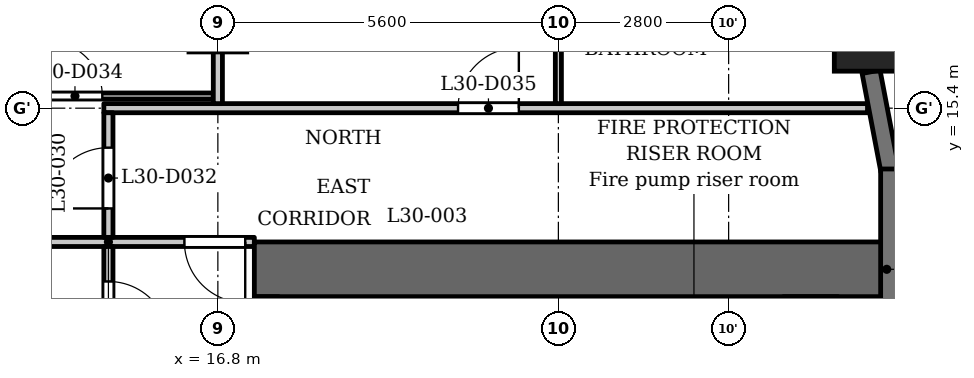
"""IFC4 building model, lengths in metres.
Left out: names, types, materials, properties, quantities, classifications, styles, units other than length and angle.
Written with IfcOpenShell. Run it as: python <this file> out.ifc"""

import sys

from ifc_helpers import new_model, si_unit, direction, frame, frame_2d, origin, origin_2d, place, context, subcontext, project, spatial, rectangle, extrude, element, fill, save


model = new_model("IFC4")
c1 = context("Model", 3, precision=1e-05, world=origin(), true_north=direction((0.0, 1.0)))
c2 = subcontext(c1, "Body", "Model", "MODEL_VIEW")
j1 = project(units=[si_unit("LENGTHUNIT", "METRE"), si_unit("PLANEANGLEUNIT", "RADIAN")], contexts=[c1])
p1 = place(None, origin())
s1 = spatial("IfcSite", under=j1, at=p1, CompositionType="ELEMENT")
p2 = place(p1, origin())
s2 = spatial("IfcBuilding", under=s1, at=p2, CompositionType="ELEMENT")
p3 = place(p2, frame((0.0, 0.0, 118.3)))
s3 = spatial("IfcBuildingStorey", under=s2, at=p3, CompositionType="ELEMENT", Elevation=118.3)
p4 = place(p3, frame((27.538, 16.609, 0.0), z_axis=(0.0, 0.0, 1.0), x_axis=(1.0, 0.0, 0.0)))
e1 = element("IfcColumn", 1, at=p4, inside=s3, PredefinedType="COLUMN", context=c2, shape_type="SweptSolid", body=[
    extrude(rectangle(XDim=1.2, YDim=1.2, at=origin_2d()), origin(), (0.0, 0.0, 1.0), 3.5),
])
p5 = place(p3, frame((16.8, 16.8, 0.0), z_axis=(0.0, 0.0, 1.0), x_axis=(1.0, 0.0, 0.0)))
e2 = element("IfcColumn", 2, at=p5, inside=s3, PredefinedType="COLUMN", context=c2, shape_type="SweptSolid", body=[
    extrude(rectangle(XDim=0.95, YDim=0.95, at=origin_2d()), origin(), (0.0, 0.0, 1.0), 3.5),
])
p6 = place(p3, frame((27.85, 11.8, 0.0), z_axis=(0.0, 0.0, 1.0), x_axis=(0.0, 1.0, 0.0)))
e3 = element("IfcWall", 3, at=p6, inside=s3, PredefinedType="SOLIDWALL", context=c2, shape_type="SweptSolid", body=[
    extrude(rectangle(XDim=2.6, YDim=0.3, at=frame_2d((1.3, 0.0))), origin(), (0.0, 0.0, 1.0), 2.4),
])
p7 = place(p3, frame((27.853, 14.372, 0.0), z_axis=(0.0, 0.0, 1.0), x_axis=(-0.187349172861, 0.982293381546, 0.0)))
e4 = element("IfcWall", 4, at=p7, inside=s3, PredefinedType="SOLIDWALL", context=c2, shape_type="SweptSolid", body=[
    extrude(rectangle(XDim=1.656, YDim=0.3, at=frame_2d((0.828, 0.0))), origin(), (0.0, 0.0, 1.0), 2.4),
])
p8 = place(p3, frame((17.4, 12.75, 0.0), z_axis=(0.0, 0.0, 1.0), x_axis=(1.0, 0.0, 0.0)))
e5 = element("IfcWall", 5, at=p8, inside=s3, PredefinedType="SHEAR", context=c2, shape_type="SweptSolid", body=[
    extrude(rectangle(XDim=10.4, YDim=0.9, at=frame_2d((5.2, 0.0))), origin(), (0.0, 0.0, 1.0), 3.2),
])
p9 = place(p3, frame((17.6, -12.3, 0.0), z_axis=(0.0, 0.0, 1.0), x_axis=(0.0, 1.0, 0.0)))
e6 = element("IfcWall", 6, at=p9, inside=s3, PredefinedType="SHEAR", context=c2, shape_type="SweptSolid", body=[
    extrude(rectangle(XDim=24.6, YDim=0.4, at=frame_2d((12.3, 0.0))), origin(), (0.0, 0.0, 1.0), 3.2),
])
p10 = place(p9, frame((6.0, 0.0, 0.0)))
e7 = element("IfcOpeningElement", 7, at=p10, cuts=e6, PredefinedType="OPENING", context=c2, shape_type="SweptSolid", body=[
    extrude(rectangle(XDim=1.1, YDim=2.1, at=frame_2d((0.55, 1.05))), frame((0.0, 0.21, 0.0), z_axis=(0.0, -1.0, 0.0), x_axis=(1.0, 0.0, 0.0)), (0.0, 0.0, 1.0), 0.42),
])
p11 = place(p9, frame((8.4, 0.0, 0.0)))
e8 = element("IfcOpeningElement", 8, at=p11, cuts=e6, PredefinedType="OPENING", context=c2, shape_type="SweptSolid", body=[
    extrude(rectangle(XDim=1.1, YDim=2.1, at=frame_2d((0.55, 1.05))), frame((0.0, 0.21, 0.0), z_axis=(0.0, -1.0, 0.0), x_axis=(1.0, 0.0, 0.0)), (0.0, 0.0, 1.0), 0.42),
])
p12 = place(p9, frame((10.8, 0.0, 0.0)))
e9 = element("IfcOpeningElement", 9, at=p12, cuts=e6, PredefinedType="OPENING", context=c2, shape_type="SweptSolid", body=[
    extrude(rectangle(XDim=1.1, YDim=2.1, at=frame_2d((0.55, 1.05))), frame((0.0, 0.21, 0.0), z_axis=(0.0, -1.0, 0.0), x_axis=(1.0, 0.0, 0.0)), (0.0, 0.0, 1.0), 0.42),
])
p13 = place(p9, frame((16.75, 0.0, 0.0)))
e10 = element("IfcOpeningElement", 10, at=p13, cuts=e6, PredefinedType="OPENING", context=c2, shape_type="SweptSolid", body=[
    extrude(rectangle(XDim=0.9, YDim=2.1, at=frame_2d((0.45, 1.05))), frame((0.0, 0.21, 0.0), z_axis=(0.0, -1.0, 0.0), x_axis=(1.0, 0.0, 0.0)), (0.0, 0.0, 1.0), 0.42),
])
p14 = place(p9, frame((22.8, 0.0, 0.0)))
e11 = element("IfcOpeningElement", 11, at=p14, cuts=e6, PredefinedType="OPENING", context=c2, shape_type="SweptSolid", body=[
    extrude(rectangle(XDim=1.1, YDim=2.1, at=frame_2d((0.55, 1.05))), frame((0.0, 0.21, 0.0), z_axis=(0.0, -1.0, 0.0), x_axis=(1.0, 0.0, 0.0)), (0.0, 0.0, 1.0), 0.42),
])
p15 = place(p9, frame((0.7, 0.0, 0.0)))
e12 = element("IfcOpeningElement", 12, at=p15, cuts=e6, PredefinedType="OPENING", context=c2, shape_type="SweptSolid", body=[
    extrude(rectangle(XDim=1.1, YDim=2.1, at=frame_2d((0.55, 1.05))), frame((0.0, 0.21, 0.0), z_axis=(0.0, -1.0, 0.0), x_axis=(1.0, 0.0, 0.0)), (0.0, 0.0, 1.0), 0.42),
])
p16 = place(p9, frame((12.775, 0.0, 0.0)))
e13 = element("IfcOpeningElement", 13, at=p16, cuts=e6, PredefinedType="OPENING", context=c2, shape_type="SweptSolid", body=[
    extrude(rectangle(XDim=1.8, YDim=2.1, at=frame_2d((0.9, 1.05))), frame((0.0, 0.21, 0.0), z_axis=(0.0, -1.0, 0.0), x_axis=(1.0, 0.0, 0.0)), (0.0, 0.0, 1.0), 0.42),
])
p17 = place(p3, frame((26.55, -12.3, 0.0), z_axis=(0.0, 0.0, 1.0), x_axis=(0.0, 1.0, 0.0)))
e14 = element("IfcWall", 14, at=p17, inside=s3, PredefinedType="SHEAR", context=c2, shape_type="SweptSolid", body=[
    extrude(rectangle(XDim=24.6, YDim=0.9, at=frame_2d((12.3, 0.0))), origin(), (0.0, 0.0, 1.0), 3.2),
])
p18 = place(p3, frame((23.55, 9.8, 0.0), z_axis=(0.0, 0.0, 1.0), x_axis=(0.0, 1.0, 0.0)))
e15 = element("IfcWall", 15, at=p18, inside=s3, PredefinedType="PARTITIONING", context=c2, shape_type="SweptSolid", body=[
    extrude(rectangle(XDim=2.5, YDim=0.2, at=frame_2d((1.25, 0.0))), origin(), (0.0, 0.0, 1.0), 3.2),
])
p19 = place(p18, frame((0.8, 0.0, 0.0)))
e16 = element("IfcOpeningElement", 16, at=p19, cuts=e15, PredefinedType="OPENING", context=c2, shape_type="SweptSolid", body=[
    extrude(rectangle(XDim=0.9, YDim=2.1, at=frame_2d((0.45, 1.05))), frame((0.0, 0.11, 0.0), z_axis=(0.0, -1.0, 0.0), x_axis=(1.0, 0.0, 0.0)), (0.0, 0.0, 1.0), 0.22),
])
p20 = place(p3, frame((-17.4, 13.2, 0.0), z_axis=(0.0, 0.0, 1.0), x_axis=(1.0, 0.0, 0.0)))
e17 = element("IfcWall", 17, at=p20, inside=s3, PredefinedType="PARTITIONING", context=c2, shape_type="SweptSolid", body=[
    extrude(rectangle(XDim=34.8, YDim=0.15, at=frame_2d((17.4, 0.0))), origin(), (0.0, 0.0, 1.0), 3.2),
])
p21 = place(p20, frame((0.25, 0.0, 0.0)))
e18 = element("IfcOpeningElement", 18, at=p21, cuts=e17, PredefinedType="OPENING", context=c2, shape_type="SweptSolid", body=[
    extrude(rectangle(XDim=1.0, YDim=2.1, at=frame_2d((0.5, 1.05))), frame((0.0, 0.085, 0.0), z_axis=(0.0, -1.0, 0.0), x_axis=(1.0, 0.0, 0.0)), (0.0, 0.0, 1.0), 0.17),
])
p22 = place(p20, frame((33.65, 0.0, 0.0)))
e19 = element("IfcOpeningElement", 19, at=p22, cuts=e17, PredefinedType="OPENING", context=c2, shape_type="SweptSolid", body=[
    extrude(rectangle(XDim=1.0, YDim=2.1, at=frame_2d((0.5, 1.05))), frame((0.0, 0.085, 0.0), z_axis=(0.0, -1.0, 0.0), x_axis=(1.0, 0.0, 0.0)), (0.0, 0.0, 1.0), 0.17),
])
p23 = place(p20, frame((15.75, 0.0, 0.0)))
e20 = element("IfcOpeningElement", 20, at=p23, cuts=e17, PredefinedType="OPENING", context=c2, shape_type="SweptSolid", body=[
    extrude(rectangle(XDim=1.0, YDim=2.1, at=frame_2d((0.5, 1.05))), frame((0.0, 0.085, 0.0), z_axis=(0.0, -1.0, 0.0), x_axis=(1.0, 0.0, 0.0)), (0.0, 0.0, 1.0), 0.17),
])
p24 = place(p20, frame((18.1, 0.0, 0.0)))
e21 = element("IfcOpeningElement", 21, at=p24, cuts=e17, PredefinedType="OPENING", context=c2, shape_type="SweptSolid", body=[
    extrude(rectangle(XDim=1.0, YDim=2.1, at=frame_2d((0.5, 1.05))), frame((0.0, 0.085, 0.0), z_axis=(0.0, -1.0, 0.0), x_axis=(1.0, 0.0, 0.0)), (0.0, 0.0, 1.0), 0.17),
])
p25 = place(p20, frame((23.55, 0.0, 0.0)))
e22 = element("IfcOpeningElement", 22, at=p25, cuts=e17, PredefinedType="OPENING", context=c2, shape_type="SweptSolid", body=[
    extrude(rectangle(XDim=1.0, YDim=2.1, at=frame_2d((0.5, 1.05))), frame((0.0, 0.085, 0.0), z_axis=(0.0, -1.0, 0.0), x_axis=(1.0, 0.0, 0.0)), (0.0, 0.0, 1.0), 0.17),
])
p26 = place(p3, frame((14.925, 15.4, 0.0), z_axis=(0.0, 0.0, 1.0), x_axis=(1.0, 0.0, 0.0)))
e23 = element("IfcWall", 23, at=p26, inside=s3, PredefinedType="PARTITIONING", context=c2, shape_type="SweptSolid", body=[
    extrude(rectangle(XDim=12.559, YDim=0.15, at=frame_2d((6.279, 0.0))), origin(), (0.0, 0.0, 1.0), 3.2),
])
p27 = place(p26, frame((5.825, 0.0, 0.0)))
e24 = element("IfcOpeningElement", 24, at=p27, cuts=e23, PredefinedType="OPENING", context=c2, shape_type="SweptSolid", body=[
    extrude(rectangle(XDim=1.0, YDim=2.1, at=frame_2d((0.5, 1.05))), frame((0.0, 0.085, 0.0), z_axis=(0.0, -1.0, 0.0), x_axis=(1.0, 0.0, 0.0)), (0.0, 0.0, 1.0), 0.17),
])
p28 = place(p3, frame((-16.725, 15.6, 0.0), z_axis=(0.0, 0.0, 1.0), x_axis=(1.0, 0.0, 0.0)))
e25 = element("IfcWall", 25, at=p28, inside=s3, PredefinedType="PARTITIONING", context=c2, shape_type="SweptSolid", body=[
    extrude(rectangle(XDim=33.45, YDim=0.1, at=frame_2d((16.725, 0.0))), origin(), (0.0, 0.0, 1.0), 3.2),
])
p29 = place(p28, frame((9.425, 0.0, 0.0)))
e26 = element("IfcOpeningElement", 26, at=p29, cuts=e25, PredefinedType="OPENING", context=c2, shape_type="SweptSolid", body=[
    extrude(rectangle(XDim=0.8, YDim=2.1, at=frame_2d((0.4, 1.05))), frame((0.0, 0.06, 0.0), z_axis=(0.0, -1.0, 0.0), x_axis=(1.0, 0.0, 0.0)), (0.0, 0.0, 1.0), 0.12),
])
p30 = place(p28, frame((6.975, 0.0, 0.0)))
e27 = element("IfcOpeningElement", 27, at=p30, cuts=e25, PredefinedType="OPENING", context=c2, shape_type="SweptSolid", body=[
    extrude(rectangle(XDim=0.9, YDim=2.1, at=frame_2d((0.45, 1.05))), frame((0.0, 0.06, 0.0), z_axis=(0.0, -1.0, 0.0), x_axis=(1.0, 0.0, 0.0)), (0.0, 0.0, 1.0), 0.12),
])
p31 = place(p28, frame((1.875, 0.0, 0.0)))
e28 = element("IfcOpeningElement", 28, at=p31, cuts=e25, PredefinedType="OPENING", context=c2, shape_type="SweptSolid", body=[
    extrude(rectangle(XDim=0.9, YDim=2.1, at=frame_2d((0.45, 1.05))), frame((0.0, 0.06, 0.0), z_axis=(0.0, -1.0, 0.0), x_axis=(1.0, 0.0, 0.0)), (0.0, 0.0, 1.0), 0.12),
])
p32 = place(p28, frame((3.475, 0.0, 0.0)))
e29 = element("IfcOpeningElement", 29, at=p32, cuts=e25, PredefinedType="OPENING", context=c2, shape_type="SweptSolid", body=[
    extrude(rectangle(XDim=0.9, YDim=2.1, at=frame_2d((0.45, 1.05))), frame((0.0, 0.06, 0.0), z_axis=(0.0, -1.0, 0.0), x_axis=(1.0, 0.0, 0.0)), (0.0, 0.0, 1.0), 0.12),
])
p33 = place(p28, frame((11.775, 0.0, 0.0)))
e30 = element("IfcOpeningElement", 30, at=p33, cuts=e25, PredefinedType="OPENING", context=c2, shape_type="SweptSolid", body=[
    extrude(rectangle(XDim=0.8, YDim=2.1, at=frame_2d((0.4, 1.05))), frame((0.0, 0.06, 0.0), z_axis=(0.0, -1.0, 0.0), x_axis=(1.0, 0.0, 0.0)), (0.0, 0.0, 1.0), 0.12),
])
p34 = place(p28, frame((14.175, 0.0, 0.0)))
e31 = element("IfcOpeningElement", 31, at=p34, cuts=e25, PredefinedType="OPENING", context=c2, shape_type="SweptSolid", body=[
    extrude(rectangle(XDim=0.9, YDim=2.1, at=frame_2d((0.45, 1.05))), frame((0.0, 0.06, 0.0), z_axis=(0.0, -1.0, 0.0), x_axis=(1.0, 0.0, 0.0)), (0.0, 0.0, 1.0), 0.12),
])
p35 = place(p28, frame((20.725, 0.0, 0.0)))
e32 = element("IfcOpeningElement", 32, at=p35, cuts=e25, PredefinedType="OPENING", context=c2, shape_type="SweptSolid", body=[
    extrude(rectangle(XDim=0.8, YDim=2.1, at=frame_2d((0.4, 1.05))), frame((0.0, 0.06, 0.0), z_axis=(0.0, -1.0, 0.0), x_axis=(1.0, 0.0, 0.0)), (0.0, 0.0, 1.0), 0.12),
])
p36 = place(p28, frame((18.375, 0.0, 0.0)))
e33 = element("IfcOpeningElement", 33, at=p36, cuts=e25, PredefinedType="OPENING", context=c2, shape_type="SweptSolid", body=[
    extrude(rectangle(XDim=0.9, YDim=2.1, at=frame_2d((0.45, 1.05))), frame((0.0, 0.06, 0.0), z_axis=(0.0, -1.0, 0.0), x_axis=(1.0, 0.0, 0.0)), (0.0, 0.0, 1.0), 0.12),
])
p37 = place(p28, frame((26.425, 0.0, 0.0)))
e34 = element("IfcOpeningElement", 34, at=p37, cuts=e25, PredefinedType="OPENING", context=c2, shape_type="SweptSolid", body=[
    extrude(rectangle(XDim=0.8, YDim=2.1, at=frame_2d((0.4, 1.05))), frame((0.0, 0.06, 0.0), z_axis=(0.0, -1.0, 0.0), x_axis=(1.0, 0.0, 0.0)), (0.0, 0.0, 1.0), 0.12),
])
p38 = place(p28, frame((23.875, 0.0, 0.0)))
e35 = element("IfcOpeningElement", 35, at=p38, cuts=e25, PredefinedType="OPENING", context=c2, shape_type="SweptSolid", body=[
    extrude(rectangle(XDim=0.9, YDim=2.1, at=frame_2d((0.45, 1.05))), frame((0.0, 0.06, 0.0), z_axis=(0.0, -1.0, 0.0), x_axis=(1.0, 0.0, 0.0)), (0.0, 0.0, 1.0), 0.12),
])
p39 = place(p28, frame((28.575, 0.0, 0.0)))
e36 = element("IfcOpeningElement", 36, at=p39, cuts=e25, PredefinedType="OPENING", context=c2, shape_type="SweptSolid", body=[
    extrude(rectangle(XDim=0.8, YDim=2.1, at=frame_2d((0.4, 1.05))), frame((0.0, 0.06, 0.0), z_axis=(0.0, -1.0, 0.0), x_axis=(1.0, 0.0, 0.0)), (0.0, 0.0, 1.0), 0.12),
])
p40 = place(p28, frame((30.725, 0.0, 0.0)))
e37 = element("IfcOpeningElement", 37, at=p40, cuts=e25, PredefinedType="OPENING", context=c2, shape_type="SweptSolid", body=[
    extrude(rectangle(XDim=0.9, YDim=2.1, at=frame_2d((0.45, 1.05))), frame((0.0, 0.06, 0.0), z_axis=(0.0, -1.0, 0.0), x_axis=(1.0, 0.0, 0.0)), (0.0, 0.0, 1.0), 0.12),
])
p41 = place(p3, frame((15.0, 6.769, 0.0), z_axis=(0.0, 0.0, 1.0), x_axis=(0.0, 1.0, 0.0)))
e38 = element("IfcWall", 38, at=p41, inside=s3, PredefinedType="PARTITIONING", context=c2, shape_type="SweptSolid", body=[
    extrude(rectangle(XDim=6.356, YDim=0.15, at=frame_2d((3.178, 0.0))), origin(), (0.0, 0.0, 1.0), 3.2),
])
p42 = place(p41, frame((4.781, 0.0, 0.0)))
e39 = element("IfcOpeningElement", 39, at=p42, cuts=e38, PredefinedType="OPENING", context=c2, shape_type="SweptSolid", body=[
    extrude(rectangle(XDim=1.0, YDim=2.1, at=frame_2d((0.5, 1.05))), frame((0.0, 0.085, 0.0), z_axis=(0.0, -1.0, 0.0), x_axis=(1.0, 0.0, 0.0)), (0.0, 0.0, 1.0), 0.17),
])
p43 = place(p3, frame((15.0, 13.275, 0.0), z_axis=(0.0, 0.0, 1.0), x_axis=(0.0, 1.0, 0.0)))
e40 = element("IfcWall", 40, at=p43, inside=s3, PredefinedType="PARTITIONING", context=c2, shape_type="SweptSolid", body=[
    extrude(rectangle(XDim=2.05, YDim=0.15, at=frame_2d((1.025, 0.0))), origin(), (0.0, 0.0, 1.0), 3.2),
])
p44 = place(p43, frame((0.476, 0.0, 0.0)))
e41 = element("IfcOpeningElement", 41, at=p44, cuts=e40, PredefinedType="OPENING", context=c2, shape_type="SweptSolid", body=[
    extrude(rectangle(XDim=1.0, YDim=2.1, at=frame_2d((0.5, 1.05))), frame((0.0, 0.085, 0.0), z_axis=(0.0, -1.0, 0.0), x_axis=(1.0, 0.0, 0.0)), (0.0, 0.0, 1.0), 0.17),
])
p45 = place(p3, frame((16.8, 15.475, 0.0), z_axis=(0.0, 0.0, 1.0), x_axis=(0.0, 1.0, 0.0)))
e42 = element("IfcWall", 42, at=p45, inside=s3, PredefinedType="PARTITIONING", context=c2, shape_type="SweptSolid", body=[
    extrude(rectangle(XDim=7.505, YDim=0.15, at=frame_2d((3.752, 0.0))), origin(), (0.0, 0.0, 1.0), 3.2),
])
p46 = place(p3, frame((22.4, 15.475, 0.0), z_axis=(0.0, 0.0, 1.0), x_axis=(0.0, 1.0, 0.0)))
e43 = element("IfcWall", 43, at=p46, inside=s3, PredefinedType="PARTITIONING", context=c2, shape_type="SweptSolid", body=[
    extrude(rectangle(XDim=2.575, YDim=0.1, at=frame_2d((1.288, 0.0))), origin(), (0.0, 0.0, 1.0), 3.2),
])
p47 = place(p42, origin())
e44 = element("IfcDoor", 44, at=p47, inside=s3, OperationType="SINGLE_SWING_LEFT", PredefinedType="DOOR", context=c2, shape_type="SweptSolid", body=[
    extrude(rectangle(XDim=1.0, YDim=2.1, at=frame_2d((0.5, 1.05))), frame((0.0, 0.025, 0.0), z_axis=(0.0, -1.0, 0.0), x_axis=(1.0, 0.0, 0.0)), (0.0, 0.0, 1.0), 0.05),
])
fill(e39, e44)
p48 = place(p22, origin())
e45 = element("IfcDoor", 45, at=p48, inside=s3, OperationType="SINGLE_SWING_RIGHT", PredefinedType="DOOR", context=c2, shape_type="SweptSolid", body=[
    extrude(rectangle(XDim=1.0, YDim=2.1, at=frame_2d((0.5, 1.05))), frame((0.0, 0.025, 0.0), z_axis=(0.0, -1.0, 0.0), x_axis=(1.0, 0.0, 0.0)), (0.0, 0.0, 1.0), 0.05),
])
fill(e19, e45)
p49 = place(p44, origin())
e46 = element("IfcDoor", 46, at=p49, inside=s3, OperationType="SINGLE_SWING_RIGHT", PredefinedType="DOOR", context=c2, shape_type="SweptSolid", body=[
    extrude(rectangle(XDim=1.0, YDim=2.1, at=frame_2d((0.5, 1.05))), frame((0.0, 0.025, 0.0), z_axis=(0.0, -1.0, 0.0), x_axis=(1.0, 0.0, 0.0)), (0.0, 0.0, 1.0), 0.05),
])
fill(e41, e46)
p50 = place(p40, origin())
e47 = element("IfcDoor", 47, at=p50, inside=s3, OperationType="SINGLE_SWING_RIGHT", PredefinedType="DOOR", context=c2, shape_type="SweptSolid", body=[
    extrude(rectangle(XDim=0.9, YDim=2.1, at=frame_2d((0.45, 1.05))), frame((0.0, 0.025, 0.0), z_axis=(0.0, -1.0, 0.0), x_axis=(1.0, 0.0, 0.0)), (0.0, 0.0, 1.0), 0.05),
])
fill(e37, e47)
p51 = place(p27, origin())
e48 = element("IfcDoor", 48, at=p51, inside=s3, OperationType="SINGLE_SWING_LEFT", PredefinedType="DOOR", context=c2, shape_type="SweptSolid", body=[
    extrude(rectangle(XDim=1.0, YDim=2.1, at=frame_2d((0.5, 1.05))), frame((0.0, 0.025, 0.0), z_axis=(0.0, -1.0, 0.0), x_axis=(1.0, 0.0, 0.0)), (0.0, 0.0, 1.0), 0.05),
])
fill(e24, e48)
save(model, sys.argv[1])
